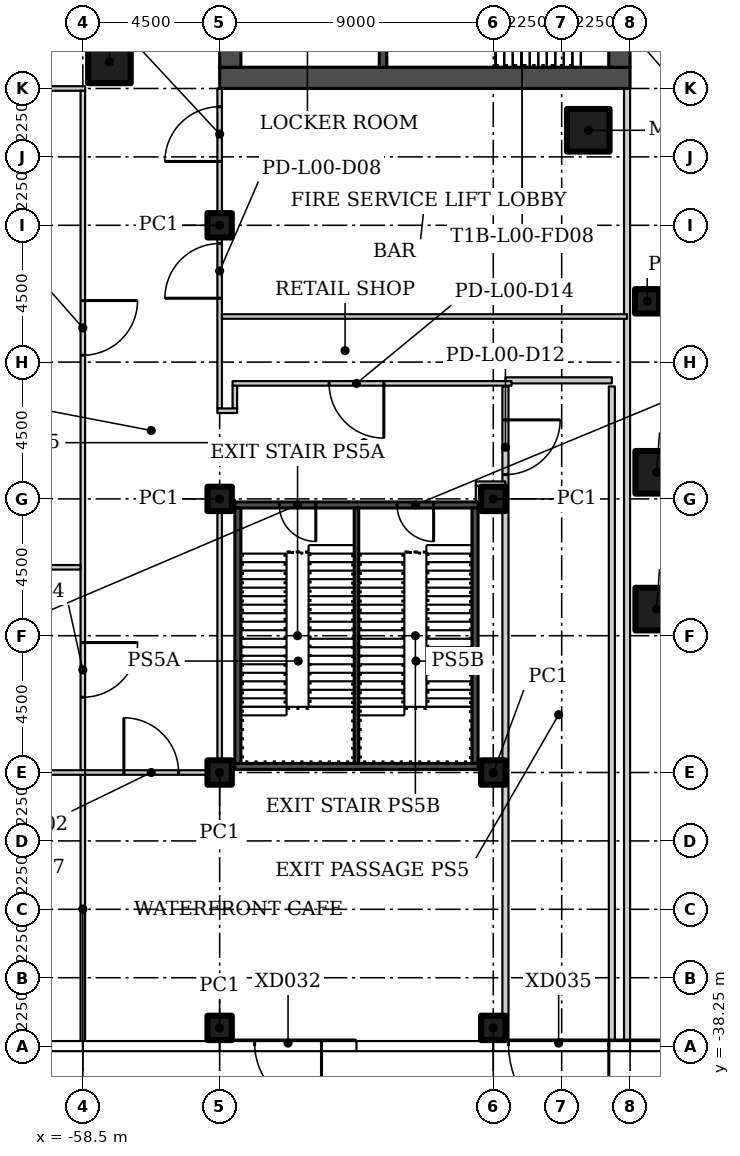
"""IFC4 building model, lengths in metres.
Left out: names, types, materials, properties, quantities, classifications, styles, units other than length and angle.
Written with IfcOpenShell. Run it as: python <this file> out.ifc"""

import sys

from ifc_helpers import new_model, si_unit, direction, frame, frame_2d, origin, origin_2d, place, context, subcontext, project, spatial, rectangle, hollow_rectangle, extrude, element, fill, save


model = new_model("IFC4")
c1 = context("Model", 3, precision=1e-05, world=origin(), true_north=direction((0.0, 1.0)))
c2 = subcontext(c1, "Body", "Model", "MODEL_VIEW")
j1 = project(units=[si_unit("LENGTHUNIT", "METRE"), si_unit("PLANEANGLEUNIT", "RADIAN")], contexts=[c1])
p1 = place(None, origin())
s1 = spatial("IfcSite", under=j1, at=p1, CompositionType="ELEMENT")
p2 = place(p1, origin())
s2 = spatial("IfcBuilding", under=s1, at=p2, CompositionType="ELEMENT")
p3 = place(p2, origin())
s3 = spatial("IfcBuildingStorey", under=s2, at=p3, CompositionType="ELEMENT", Elevation=0.0)
for number, where in (
    (1, (-41.875, -8.125, 0.0)),
    (2, (-57.625, -5.875, 0.0)),
):
    element("IfcColumn", number, at=place(p3, frame(where)), inside=s3, PredefinedType="COLUMN", context=c2, shape_type="SweptSolid", body=[
        extrude(hollow_rectangle(XDim=1.4, YDim=1.4, WallThickness=0.06, at=origin_2d()), origin(), (0.0, 0.0, 1.0), 6.1),
    ])
p4 = place(p3, frame((-39.938, -13.75, 0.0)))
e3 = element("IfcColumn", 3, at=p4, inside=s3, PredefinedType="COLUMN", context=c2, shape_type="SweptSolid", body=[
    extrude(hollow_rectangle(XDim=0.8, YDim=0.8, WallThickness=0.03, at=origin_2d()), origin(), (0.0, 0.0, 1.0), 6.1),
])
for number, where in (
    (4, (-39.625, -19.375, 0.0)),
    (5, (-39.625, -23.875, 0.0)),
):
    element("IfcColumn", number, at=place(p3, frame(where)), inside=s3, PredefinedType="COLUMN", context=c2, shape_type="SweptSolid", body=[
        extrude(hollow_rectangle(XDim=1.4, YDim=1.4, WallThickness=0.06, at=origin_2d()), origin(), (0.0, 0.0, 1.0), 6.1),
    ])
for number, where in (
    (6, (-54.0, -37.65, 0.0)),
    (7, (-54.0, -29.25, 0.0)),
    (8, (-54.0, -20.25, 0.0)),
    (9, (-54.0, -11.25, 0.0)),
    (10, (-45.0, -37.65, 0.0)),
    (11, (-45.0, -29.25, 0.0)),
    (12, (-45.0, -20.25, 0.0)),
):
    element("IfcColumn", number, at=place(p3, frame(where)), inside=s3, PredefinedType="COLUMN", context=c2, shape_type="SweptSolid", body=[
        extrude(hollow_rectangle(XDim=0.8, YDim=0.8, WallThickness=0.03, at=origin_2d()), origin(), (0.0, 0.0, 1.0), 6.1),
    ])
p5 = place(p3, frame((-40.6, -6.75, 0.0), z_axis=(0.0, 0.0, 1.0), x_axis=(0.0, -1.0, 0.0)))
e13 = element("IfcWall", 13, at=p5, inside=s3, PredefinedType="PARTITIONING", context=c2, shape_type="SweptSolid", body=[
    extrude(rectangle(XDim=31.405, YDim=0.2, at=frame_2d((15.703, 0.0))), origin(), (0.0, 0.0, 1.0), 6.1),
])
p6 = place(p3, frame((-44.6, -16.55, 0.0), z_axis=(0.0, 0.0, 1.0), x_axis=(0.0, -1.0, 0.0)))
e14 = element("IfcWall", 14, at=p6, inside=s3, PredefinedType="PARTITIONING", context=c2, shape_type="SweptSolid", body=[
    extrude(rectangle(XDim=21.605, YDim=0.2, at=frame_2d((10.802, 0.0))), origin(), (0.0, 0.0, 1.0), 6.1),
])
p7 = place(p6, frame((1.1, 0.0, 0.0)))
e15 = element("IfcOpeningElement", 15, at=p7, cuts=e14, PredefinedType="OPENING", context=c2, shape_type="SweptSolid", body=[
    extrude(rectangle(XDim=1.8, YDim=2.1, at=frame_2d((0.9, 1.05))), frame((0.0, 0.11, 0.0), z_axis=(0.0, -1.0, 0.0), x_axis=(1.0, 0.0, 0.0)), (0.0, 0.0, 1.0), 0.22),
])
p8 = place(p3, frame((-41.1, -38.155, 0.0), z_axis=(0.0, 0.0, 1.0), x_axis=(0.0, 1.0, 0.0)))
e16 = element("IfcWall", 16, at=p8, inside=s3, PredefinedType="PARTITIONING", context=c2, shape_type="SweptSolid", body=[
    extrude(rectangle(XDim=21.605, YDim=0.2, at=frame_2d((10.802, 0.0))), origin(), (0.0, 0.0, 1.0), 6.1),
])
p9 = place(p3, frame((-41.1, -16.35, 0.0), z_axis=(0.0, 0.0, 1.0), x_axis=(-1.0, 0.0, 0.0)))
e17 = element("IfcWall", 17, at=p9, inside=s3, PredefinedType="PARTITIONING", context=c2, shape_type="SweptSolid", body=[
    extrude(rectangle(XDim=3.5, YDim=0.2, at=frame_2d((1.75, 0.0))), origin(), (0.0, 0.0, 1.0), 6.1),
])
p10 = place(p3, frame((-67.405, -6.75, 0.0)))
e18 = element("IfcWall", 18, at=p10, inside=s3, PredefinedType="PARTITIONING", context=c2, shape_type="SweptSolid", body=[
    extrude(rectangle(XDim=8.98, YDim=0.15, at=frame_2d((4.49, 0.0))), origin(), (0.0, 0.0, 1.0), 6.1),
])
p11 = place(p10, frame((2.755, 0.0, 0.0)))
e19 = element("IfcOpeningElement", 19, at=p11, cuts=e18, PredefinedType="OPENING", context=c2, shape_type="SweptSolid", body=[
    extrude(rectangle(XDim=1.8, YDim=2.4, at=frame_2d((0.9, 1.2))), frame((0.0, 0.085, 0.0), z_axis=(0.0, -1.0, 0.0), x_axis=(1.0, 0.0, 0.0)), (0.0, 0.0, 1.0), 0.17),
])
p12 = place(p3, frame((-54.0, -29.175, 0.0), z_axis=(0.0, 0.0, 1.0), x_axis=(0.0, 1.0, 0.0)))
e20 = element("IfcWall", 20, at=p12, inside=s3, PredefinedType="PARTITIONING", context=c2, shape_type="SweptSolid", body=[
    extrude(rectangle(XDim=8.75, YDim=0.15, at=frame_2d((4.375, 0.0))), origin(), (0.0, 0.0, 1.0), 6.1),
])
p13 = place(p3, frame((-54.0, -17.275, 0.0), z_axis=(0.0, 0.0, 1.0), x_axis=(0.0, 1.0, 0.0)))
e21 = element("IfcWall", 21, at=p13, inside=s3, PredefinedType="PARTITIONING", context=c2, shape_type="SweptSolid", body=[
    extrude(rectangle(XDim=10.525, YDim=0.15, at=frame_2d((5.262, 0.0))), origin(), (0.0, 0.0, 1.0), 6.1),
])
p14 = place(p13, frame((3.625, 0.0, 0.0)))
e22 = element("IfcOpeningElement", 22, at=p14, cuts=e21, PredefinedType="OPENING", context=c2, shape_type="SweptSolid", body=[
    extrude(rectangle(XDim=1.8, YDim=2.4, at=frame_2d((0.9, 1.2))), frame((0.0, 0.085, 0.0), z_axis=(0.0, -1.0, 0.0), x_axis=(1.0, 0.0, 0.0)), (0.0, 0.0, 1.0), 0.17),
])
p15 = place(p13, frame((8.125, 0.0, 0.0)))
e23 = element("IfcOpeningElement", 23, at=p15, cuts=e21, PredefinedType="OPENING", context=c2, shape_type="SweptSolid", body=[
    extrude(rectangle(XDim=1.8, YDim=2.4, at=frame_2d((0.9, 1.2))), frame((0.0, 0.085, 0.0), z_axis=(0.0, -1.0, 0.0), x_axis=(1.0, 0.0, 0.0)), (0.0, 0.0, 1.0), 0.17),
])
p16 = place(p3, frame((-58.5, -6.825, 0.0), z_axis=(0.0, 0.0, 1.0), x_axis=(0.0, -1.0, 0.0)))
e24 = element("IfcWall", 24, at=p16, inside=s3, PredefinedType="PARTITIONING", context=c2, shape_type="SweptSolid", body=[
    extrude(rectangle(XDim=22.35, YDim=0.15, at=frame_2d((11.175, 0.0))), origin(), (0.0, 0.0, 1.0), 6.1),
])
p17 = place(p16, frame((6.9, 0.0, 0.0)))
e25 = element("IfcOpeningElement", 25, at=p17, cuts=e24, PredefinedType="OPENING", context=c2, shape_type="SweptSolid", body=[
    extrude(rectangle(XDim=1.8, YDim=2.4, at=frame_2d((0.9, 1.2))), frame((0.0, 0.085, 0.0), z_axis=(0.0, -1.0, 0.0), x_axis=(1.0, 0.0, 0.0)), (0.0, 0.0, 1.0), 0.17),
])
p18 = place(p16, frame((18.15, 0.0, 0.0)))
e26 = element("IfcOpeningElement", 26, at=p18, cuts=e24, PredefinedType="OPENING", context=c2, shape_type="SweptSolid", body=[
    extrude(rectangle(XDim=1.8, YDim=2.4, at=frame_2d((0.9, 1.2))), frame((0.0, 0.085, 0.0), z_axis=(0.0, -1.0, 0.0), x_axis=(1.0, 0.0, 0.0)), (0.0, 0.0, 1.0), 0.17),
])
p19 = place(p3, frame((-58.5, -38.155, 0.0), z_axis=(0.0, 0.0, 1.0), x_axis=(0.0, 1.0, 0.0)))
e27 = element("IfcWall", 27, at=p19, inside=s3, PredefinedType="PARTITIONING", context=c2, shape_type="SweptSolid", body=[
    extrude(rectangle(XDim=8.83, YDim=0.15, at=frame_2d((4.415, 0.0))), origin(), (0.0, 0.0, 1.0), 6.1),
])
p20 = place(p3, frame((-58.575, -29.25, 0.0)))
e28 = element("IfcWall", 28, at=p20, inside=s3, PredefinedType="PARTITIONING", context=c2, shape_type="SweptSolid", body=[
    extrude(rectangle(XDim=4.65, YDim=0.15, at=frame_2d((2.325, 0.0))), origin(), (0.0, 0.0, 1.0), 6.1),
])
p21 = place(p20, frame((1.425, 0.0, 0.0)))
e29 = element("IfcOpeningElement", 29, at=p21, cuts=e28, PredefinedType="OPENING", context=c2, shape_type="SweptSolid", body=[
    extrude(rectangle(XDim=1.8, YDim=2.4, at=frame_2d((0.9, 1.2))), frame((0.0, 0.085, 0.0), z_axis=(0.0, -1.0, 0.0), x_axis=(1.0, 0.0, 0.0)), (0.0, 0.0, 1.0), 0.17),
])
p22 = place(p3, frame((-53.5, -16.525, 0.0), z_axis=(0.0, 0.0, 1.0), x_axis=(0.0, -1.0, 0.0)))
e30 = element("IfcWall", 30, at=p22, inside=s3, PredefinedType="PARTITIONING", context=c2, shape_type="SweptSolid", body=[
    extrude(rectangle(XDim=0.75, YDim=0.15, at=frame_2d((0.375, 0.0))), origin(), (0.0, 0.0, 1.0), 6.1),
])
p23 = place(p3, frame((-45.575, -19.75, 0.0)))
e31 = element("IfcWall", 31, at=p23, inside=s3, PredefinedType="PARTITIONING", context=c2, shape_type="SweptSolid", body=[
    extrude(rectangle(XDim=0.975, YDim=0.15, at=frame_2d((0.487, 0.0))), origin(), (0.0, 0.0, 1.0), 6.1),
])
p24 = place(p3, frame((-45.5, -20.35, 0.0), z_axis=(0.0, 0.0, 1.0), x_axis=(0.0, 1.0, 0.0)))
e32 = element("IfcWall", 32, at=p24, inside=s3, PredefinedType="PARTITIONING", context=c2, shape_type="SweptSolid", body=[
    extrude(rectangle(XDim=0.525, YDim=0.15, at=frame_2d((0.262, 0.0))), origin(), (0.0, 0.0, 1.0), 6.1),
])
p25 = place(p3, frame((-54.075, -20.35, 0.0)))
e33 = element("IfcWall", 33, at=p25, inside=s3, PredefinedType="PARTITIONING", context=c2, shape_type="SweptSolid", body=[
    extrude(rectangle(XDim=0.575, YDim=0.15, at=frame_2d((0.288, 0.0))), origin(), (0.0, 0.0, 1.0), 6.1),
])
p26 = place(p3, frame((-44.4, -16.45, 0.0), z_axis=(0.0, 0.0, 1.0), x_axis=(-1.0, 0.0, 0.0)))
e34 = element("IfcWall", 34, at=p26, inside=s3, PredefinedType="PARTITIONING", context=c2, shape_type="SweptSolid", body=[
    extrude(rectangle(XDim=9.175, YDim=0.15, at=frame_2d((4.587, 0.0))), origin(), (0.0, 0.0, 1.0), 6.1),
])
p27 = place(p26, frame((4.2, 0.0, 0.0)))
e35 = element("IfcOpeningElement", 35, at=p27, cuts=e34, PredefinedType="OPENING", context=c2, shape_type="SweptSolid", body=[
    extrude(rectangle(XDim=1.8, YDim=2.4, at=frame_2d((0.9, 1.2))), frame((0.0, 0.085, 0.0), z_axis=(0.0, -1.0, 0.0), x_axis=(1.0, 0.0, 0.0)), (0.0, 0.0, 1.0), 0.17),
])
p28 = place(p3, frame((-53.425, -17.35, 0.0), z_axis=(0.0, 0.0, 1.0), x_axis=(-1.0, 0.0, 0.0)))
e36 = element("IfcWall", 36, at=p28, inside=s3, PredefinedType="PARTITIONING", context=c2, shape_type="SweptSolid", body=[
    extrude(rectangle(XDim=0.65, YDim=0.15, at=frame_2d((0.325, 0.0))), origin(), (0.0, 0.0, 1.0), 6.1),
])
p29 = place(p3, frame((-58.425, -29.25, 0.0), z_axis=(0.0, 0.0, 1.0), x_axis=(-1.0, 0.0, 0.0)))
e37 = element("IfcWall", 37, at=p29, inside=s3, PredefinedType="PARTITIONING", context=c2, shape_type="SweptSolid", body=[
    extrude(rectangle(XDim=8.98, YDim=0.15, at=frame_2d((4.49, 0.0))), origin(), (0.0, 0.0, 1.0), 6.1),
])
p30 = place(p3, frame((-40.6, -14.25, 0.0), z_axis=(0.0, 0.0, 1.0), x_axis=(-1.0, 0.0, 0.0)))
e38 = element("IfcWall", 38, at=p30, inside=s3, PredefinedType="PARTITIONING", context=c2, shape_type="SweptSolid", body=[
    extrude(rectangle(XDim=13.325, YDim=0.15, at=frame_2d((6.663, 0.0))), origin(), (0.0, 0.0, 1.0), 6.1),
])
p31 = place(p3, frame((-58.575, -22.5, 0.0), z_axis=(0.0, 0.0, 1.0), x_axis=(-1.0, 0.0, 0.0)))
e39 = element("IfcWall", 39, at=p31, inside=s3, PredefinedType="PARTITIONING", context=c2, shape_type="SweptSolid", body=[
    extrude(rectangle(XDim=8.83, YDim=0.15, at=frame_2d((4.415, 0.0))), origin(), (0.0, 0.0, 1.0), 6.1),
])
p32 = place(p3, frame((-35.993, -38.15, 0.0), z_axis=(0.0, 0.0, 1.0), x_axis=(-1.0, 0.0, 0.0)))
e40 = element("IfcWall", 40, at=p32, inside=s3, PredefinedType="SOLIDWALL", context=c2, shape_type="SweptSolid", body=[
    extrude(rectangle(XDim=4.514, YDim=0.2, at=frame_2d((2.257, 0.0))), origin(), (0.0, 0.0, 1.0), 3.0),
])
p33 = place(p32, frame((1.657, 0.0, 0.0)))
e41 = element("IfcOpeningElement", 41, at=p33, cuts=e40, PredefinedType="OPENING", context=c2, shape_type="SweptSolid", body=[
    extrude(rectangle(XDim=1.2, YDim=2.4, at=frame_2d((0.6, 1.2))), frame((0.0, 0.11, 0.0), z_axis=(0.0, -1.0, 0.0), x_axis=(1.0, 0.0, 0.0)), (0.0, 0.0, 1.0), 0.22),
])
p34 = place(p3, frame((-49.54, -38.15, 0.0), z_axis=(0.0, 0.0, 1.0), x_axis=(-1.0, 0.0, 0.0)))
e42 = element("IfcWall", 42, at=p34, inside=s3, PredefinedType="SOLIDWALL", context=c2, shape_type="SweptSolid", body=[
    extrude(rectangle(XDim=4.42, YDim=0.2, at=frame_2d((2.21, 0.0))), origin(), (0.0, 0.0, 1.0), 3.0),
])
p35 = place(p34, frame((1.11, 0.0, 0.0)))
e43 = element("IfcOpeningElement", 43, at=p35, cuts=e42, PredefinedType="OPENING", context=c2, shape_type="SweptSolid", body=[
    extrude(rectangle(XDim=2.2, YDim=2.4, at=frame_2d((1.1, 1.2))), frame((0.0, 0.11, 0.0), z_axis=(0.0, -1.0, 0.0), x_axis=(1.0, 0.0, 0.0)), (0.0, 0.0, 1.0), 0.22),
])
p36 = place(p3, frame((-40.533, -38.15, 0.0), z_axis=(0.0, 0.0, 1.0), x_axis=(-1.0, 0.0, 0.0)))
e44 = element("IfcWall", 44, at=p36, inside=s3, PredefinedType="SOLIDWALL", context=c2, shape_type="SweptSolid", body=[
    extrude(rectangle(XDim=4.427, YDim=0.2, at=frame_2d((2.213, 0.0))), origin(), (0.0, 0.0, 1.0), 3.0),
])
p37 = place(p36, frame((0.667, 0.0, 0.0)))
e45 = element("IfcOpeningElement", 45, at=p37, cuts=e44, PredefinedType="OPENING", context=c2, shape_type="SweptSolid", body=[
    extrude(rectangle(XDim=3.3, YDim=2.4, at=frame_2d((1.65, 1.2))), frame((0.0, 0.11, 0.0), z_axis=(0.0, -1.0, 0.0), x_axis=(1.0, 0.0, 0.0)), (0.0, 0.0, 1.0), 0.22),
])
p38 = place(p3, frame((-40.5, -6.4, 0.0), z_axis=(0.0, 0.0, 1.0), x_axis=(-1.0, 0.0, 0.0)))
e46 = element("IfcWall", 46, at=p38, inside=s3, PredefinedType="SHEAR", context=c2, shape_type="SweptSolid", body=[
    extrude(rectangle(XDim=13.5, YDim=0.7, at=frame_2d((6.75, 0.0))), origin(), (0.0, 0.0, 1.0), 6.1),
])
p39 = place(p3, frame((-40.85, -3.5, 0.0), z_axis=(0.0, 0.0, 1.0), x_axis=(0.0, -1.0, 0.0)))
e47 = element("IfcWall", 47, at=p39, inside=s3, PredefinedType="SHEAR", context=c2, shape_type="SweptSolid", body=[
    extrude(rectangle(XDim=2.55, YDim=0.7, at=frame_2d((1.275, 0.0))), origin(), (0.0, 0.0, 1.0), 6.1),
])
p40 = place(p39, frame((0.675, 0.0, 0.0)))
e48 = element("IfcOpeningElement", 48, at=p40, cuts=e47, PredefinedType="OPENING", context=c2, shape_type="SweptSolid", body=[
    extrude(rectangle(XDim=1.2, YDim=2.4, at=frame_2d((0.6, 1.2))), frame((0.0, 0.36, 0.0), z_axis=(0.0, -1.0, 0.0), x_axis=(1.0, 0.0, 0.0)), (0.0, 0.0, 1.0), 0.72),
])
p41 = place(p3, frame((-53.65, -6.05, 0.0), z_axis=(0.0, 0.0, 1.0), x_axis=(0.0, 1.0, 0.0)))
e49 = element("IfcWall", 49, at=p41, inside=s3, PredefinedType="SHEAR", context=c2, shape_type="SweptSolid", body=[
    extrude(rectangle(XDim=12.1, YDim=0.7, at=frame_2d((6.05, 0.0))), origin(), (0.0, 0.0, 1.0), 6.1),
])
p42 = place(p41, frame((0.8, 0.0, 0.0)))
e50 = element("IfcOpeningElement", 50, at=p42, cuts=e49, PredefinedType="OPENING", context=c2, shape_type="SweptSolid", body=[
    extrude(rectangle(XDim=1.2, YDim=2.1, at=frame_2d((0.6, 1.05))), frame((0.0, 0.36, 0.0), z_axis=(0.0, -1.0, 0.0), x_axis=(1.0, 0.0, 0.0)), (0.0, 0.0, 1.0), 0.72),
])
p43 = place(p41, frame((6.4, 0.0, 0.0)))
e51 = element("IfcOpeningElement", 51, at=p43, cuts=e49, PredefinedType="OPENING", context=c2, shape_type="SweptSolid", body=[
    extrude(rectangle(XDim=1.8, YDim=2.4, at=frame_2d((0.9, 1.2))), frame((0.0, 0.36, 0.0), z_axis=(0.0, -1.0, 0.0), x_axis=(1.0, 0.0, 0.0)), (0.0, 0.0, 1.0), 0.72),
])
p44 = place(p3, frame((-48.625, -6.05, 0.0), z_axis=(0.0, 0.0, 1.0), x_axis=(0.0, 1.0, 0.0)))
e52 = element("IfcWall", 52, at=p44, inside=s3, PredefinedType="SHEAR", context=c2, shape_type="SweptSolid", body=[
    extrude(rectangle(XDim=2.55, YDim=0.25, at=frame_2d((1.275, 0.0))), origin(), (0.0, 0.0, 1.0), 6.1),
])
p45 = place(p3, frame((-45.5, -20.45, 0.0), z_axis=(0.0, 0.0, 1.0), x_axis=(-1.0, 0.0, 0.0)))
e53 = element("IfcWall", 53, at=p45, inside=s3, PredefinedType="SHEAR", context=c2, shape_type="SweptSolid", body=[
    extrude(rectangle(XDim=8.0, YDim=0.2, at=frame_2d((4.0, 0.0))), origin(), (0.0, 0.0, 1.0), 6.1),
])
p46 = place(p45, frame((5.337, 0.0, 0.0)))
e54 = element("IfcOpeningElement", 54, at=p46, cuts=e53, PredefinedType="OPENING", context=c2, shape_type="SweptSolid", body=[
    extrude(rectangle(XDim=1.2, YDim=2.4, at=frame_2d((0.6, 1.2))), frame((0.0, 0.11, 0.0), z_axis=(0.0, -1.0, 0.0), x_axis=(1.0, 0.0, 0.0)), (0.0, 0.0, 1.0), 0.22),
])
p47 = place(p45, frame((1.462, 0.0, 0.0)))
e55 = element("IfcOpeningElement", 55, at=p47, cuts=e53, PredefinedType="OPENING", context=c2, shape_type="SweptSolid", body=[
    extrude(rectangle(XDim=1.2, YDim=2.4, at=frame_2d((0.6, 1.2))), frame((0.0, 0.11, 0.0), z_axis=(0.0, -1.0, 0.0), x_axis=(1.0, 0.0, 0.0)), (0.0, 0.0, 1.0), 0.22),
])
p48 = place(p3, frame((-53.5, -29.05, 0.0)))
e56 = element("IfcWall", 56, at=p48, inside=s3, PredefinedType="SHEAR", context=c2, shape_type="SweptSolid", body=[
    extrude(rectangle(XDim=8.0, YDim=0.2, at=frame_2d((4.0, 0.0))), origin(), (0.0, 0.0, 1.0), 6.1),
])
for number, where, z_axis, x_axis in (
    (57, (-53.4, -28.95, 0.0), (0.0, 0.0, 1.0), (0.0, 1.0, 0.0)),
    (58, (-45.6, -28.95, 0.0), (0.0, 0.0, 1.0), (0.0, 1.0, 0.0)),
):
    element("IfcWall", number, at=place(p3, frame(where, z_axis=z_axis, x_axis=x_axis)), inside=s3, PredefinedType="SHEAR", context=c2, shape_type="SweptSolid", body=[
        extrude(rectangle(XDim=8.4, YDim=0.2, at=frame_2d((4.2, 0.0))), origin(), (0.0, 0.0, 1.0), 6.1),
    ])
p49 = place(p3, frame((-49.5, -28.95, 0.0), z_axis=(0.0, 0.0, 1.0), x_axis=(0.0, 1.0, 0.0)))
e59 = element("IfcWall", 59, at=p49, inside=s3, PredefinedType="SHEAR", context=c2, shape_type="SweptSolid", body=[
    extrude(rectangle(XDim=8.4, YDim=0.15, at=frame_2d((4.2, 0.0))), origin(), (0.0, 0.0, 1.0), 6.1),
])
p50 = place(p21, origin())
e60 = element("IfcDoor", 60, at=p50, inside=s3, OperationType="DOUBLE_DOOR_SINGLE_SWING", PredefinedType="DOOR", context=c2, shape_type="SweptSolid", body=[
    extrude(rectangle(XDim=1.8, YDim=2.4, at=frame_2d((0.9, 1.2))), frame((0.0, 0.025, 0.0), z_axis=(0.0, -1.0, 0.0), x_axis=(1.0, 0.0, 0.0)), (0.0, 0.0, 1.0), 0.05),
])
fill(e29, e60)
p51 = place(p17, origin())
e61 = element("IfcDoor", 61, at=p51, inside=s3, OperationType="DOUBLE_DOOR_SINGLE_SWING", PredefinedType="DOOR", context=c2, shape_type="SweptSolid", body=[
    extrude(rectangle(XDim=1.8, YDim=2.4, at=frame_2d((0.9, 1.2))), frame((0.0, 0.025, 0.0), z_axis=(0.0, -1.0, 0.0), x_axis=(1.0, 0.0, 0.0)), (0.0, 0.0, 1.0), 0.05),
])
fill(e25, e61)
p52 = place(p18, origin())
e62 = element("IfcDoor", 62, at=p52, inside=s3, OperationType="DOUBLE_DOOR_SINGLE_SWING", PredefinedType="DOOR", context=c2, shape_type="SweptSolid", body=[
    extrude(rectangle(XDim=1.8, YDim=2.4, at=frame_2d((0.9, 1.2))), frame((0.0, 0.025, 0.0), z_axis=(0.0, -1.0, 0.0), x_axis=(1.0, 0.0, 0.0)), (0.0, 0.0, 1.0), 0.05),
])
fill(e26, e62)
p53 = place(p14, origin())
e63 = element("IfcDoor", 63, at=p53, inside=s3, OperationType="DOUBLE_DOOR_SINGLE_SWING", PredefinedType="DOOR", context=c2, shape_type="SweptSolid", body=[
    extrude(rectangle(XDim=1.8, YDim=2.4, at=frame_2d((0.9, 1.2))), frame((0.0, 0.025, 0.0), z_axis=(0.0, -1.0, 0.0), x_axis=(1.0, 0.0, 0.0)), (0.0, 0.0, 1.0), 0.05),
])
fill(e22, e63)
p54 = place(p15, origin())
e64 = element("IfcDoor", 64, at=p54, inside=s3, OperationType="DOUBLE_DOOR_SINGLE_SWING", PredefinedType="DOOR", context=c2, shape_type="SweptSolid", body=[
    extrude(rectangle(XDim=1.8, YDim=2.4, at=frame_2d((0.9, 1.2))), frame((0.0, 0.025, 0.0), z_axis=(0.0, -1.0, 0.0), x_axis=(1.0, 0.0, 0.0)), (0.0, 0.0, 1.0), 0.05),
])
fill(e23, e64)
p55 = place(p7, origin())
e65 = element("IfcDoor", 65, at=p55, inside=s3, OperationType="DOUBLE_DOOR_SINGLE_SWING", PredefinedType="DOOR", context=c2, shape_type="SweptSolid", body=[
    extrude(rectangle(XDim=1.8, YDim=2.1, at=frame_2d((0.9, 1.05))), frame((0.0, 0.025, 0.0), z_axis=(0.0, -1.0, 0.0), x_axis=(1.0, 0.0, 0.0)), (0.0, 0.0, 1.0), 0.05),
])
fill(e15, e65)
p56 = place(p27, origin())
e66 = element("IfcDoor", 66, at=p56, inside=s3, OperationType="DOUBLE_DOOR_SINGLE_SWING", PredefinedType="DOOR", context=c2, shape_type="SweptSolid", body=[
    extrude(rectangle(XDim=1.8, YDim=2.4, at=frame_2d((0.9, 1.2))), frame((0.0, 0.025, 0.0), z_axis=(0.0, -1.0, 0.0), x_axis=(1.0, 0.0, 0.0)), (0.0, 0.0, 1.0), 0.05),
])
fill(e35, e66)
p57 = place(p35, origin())
e67 = element("IfcDoor", 67, at=p57, inside=s3, OperationType="DOUBLE_DOOR_SINGLE_SWING", PredefinedType="DOOR", context=c2, shape_type="SweptSolid", body=[
    extrude(rectangle(XDim=2.2, YDim=2.4, at=frame_2d((1.1, 1.2))), frame((0.0, 0.025, 0.0), z_axis=(0.0, -1.0, 0.0), x_axis=(1.0, 0.0, 0.0)), (0.0, 0.0, 1.0), 0.05),
])
fill(e43, e67)
p58 = place(p37, origin())
e68 = element("IfcDoor", 68, at=p58, inside=s3, OperationType="DOUBLE_DOOR_SINGLE_SWING", PredefinedType="DOOR", context=c2, shape_type="SweptSolid", body=[
    extrude(rectangle(XDim=3.3, YDim=2.4, at=frame_2d((1.65, 1.2))), frame((0.0, 0.025, 0.0), z_axis=(0.0, -1.0, 0.0), x_axis=(1.0, 0.0, 0.0)), (0.0, 0.0, 1.0), 0.05),
])
fill(e45, e68)
p59 = place(p46, origin())
e69 = element("IfcDoor", 69, at=p59, inside=s3, OperationType="SINGLE_SWING_LEFT", PredefinedType="DOOR", context=c2, shape_type="SweptSolid", body=[
    extrude(rectangle(XDim=1.2, YDim=2.4, at=frame_2d((0.6, 1.2))), frame((0.0, 0.025, 0.0), z_axis=(0.0, -1.0, 0.0), x_axis=(1.0, 0.0, 0.0)), (0.0, 0.0, 1.0), 0.05),
])
fill(e54, e69)
p60 = place(p47, origin())
e70 = element("IfcDoor", 70, at=p60, inside=s3, OperationType="SINGLE_SWING_RIGHT", PredefinedType="DOOR", context=c2, shape_type="SweptSolid", body=[
    extrude(rectangle(XDim=1.2, YDim=2.4, at=frame_2d((0.6, 1.2))), frame((0.0, 0.025, 0.0), z_axis=(0.0, -1.0, 0.0), x_axis=(1.0, 0.0, 0.0)), (0.0, 0.0, 1.0), 0.05),
])
fill(e55, e70)
save(model, sys.argv[1])
